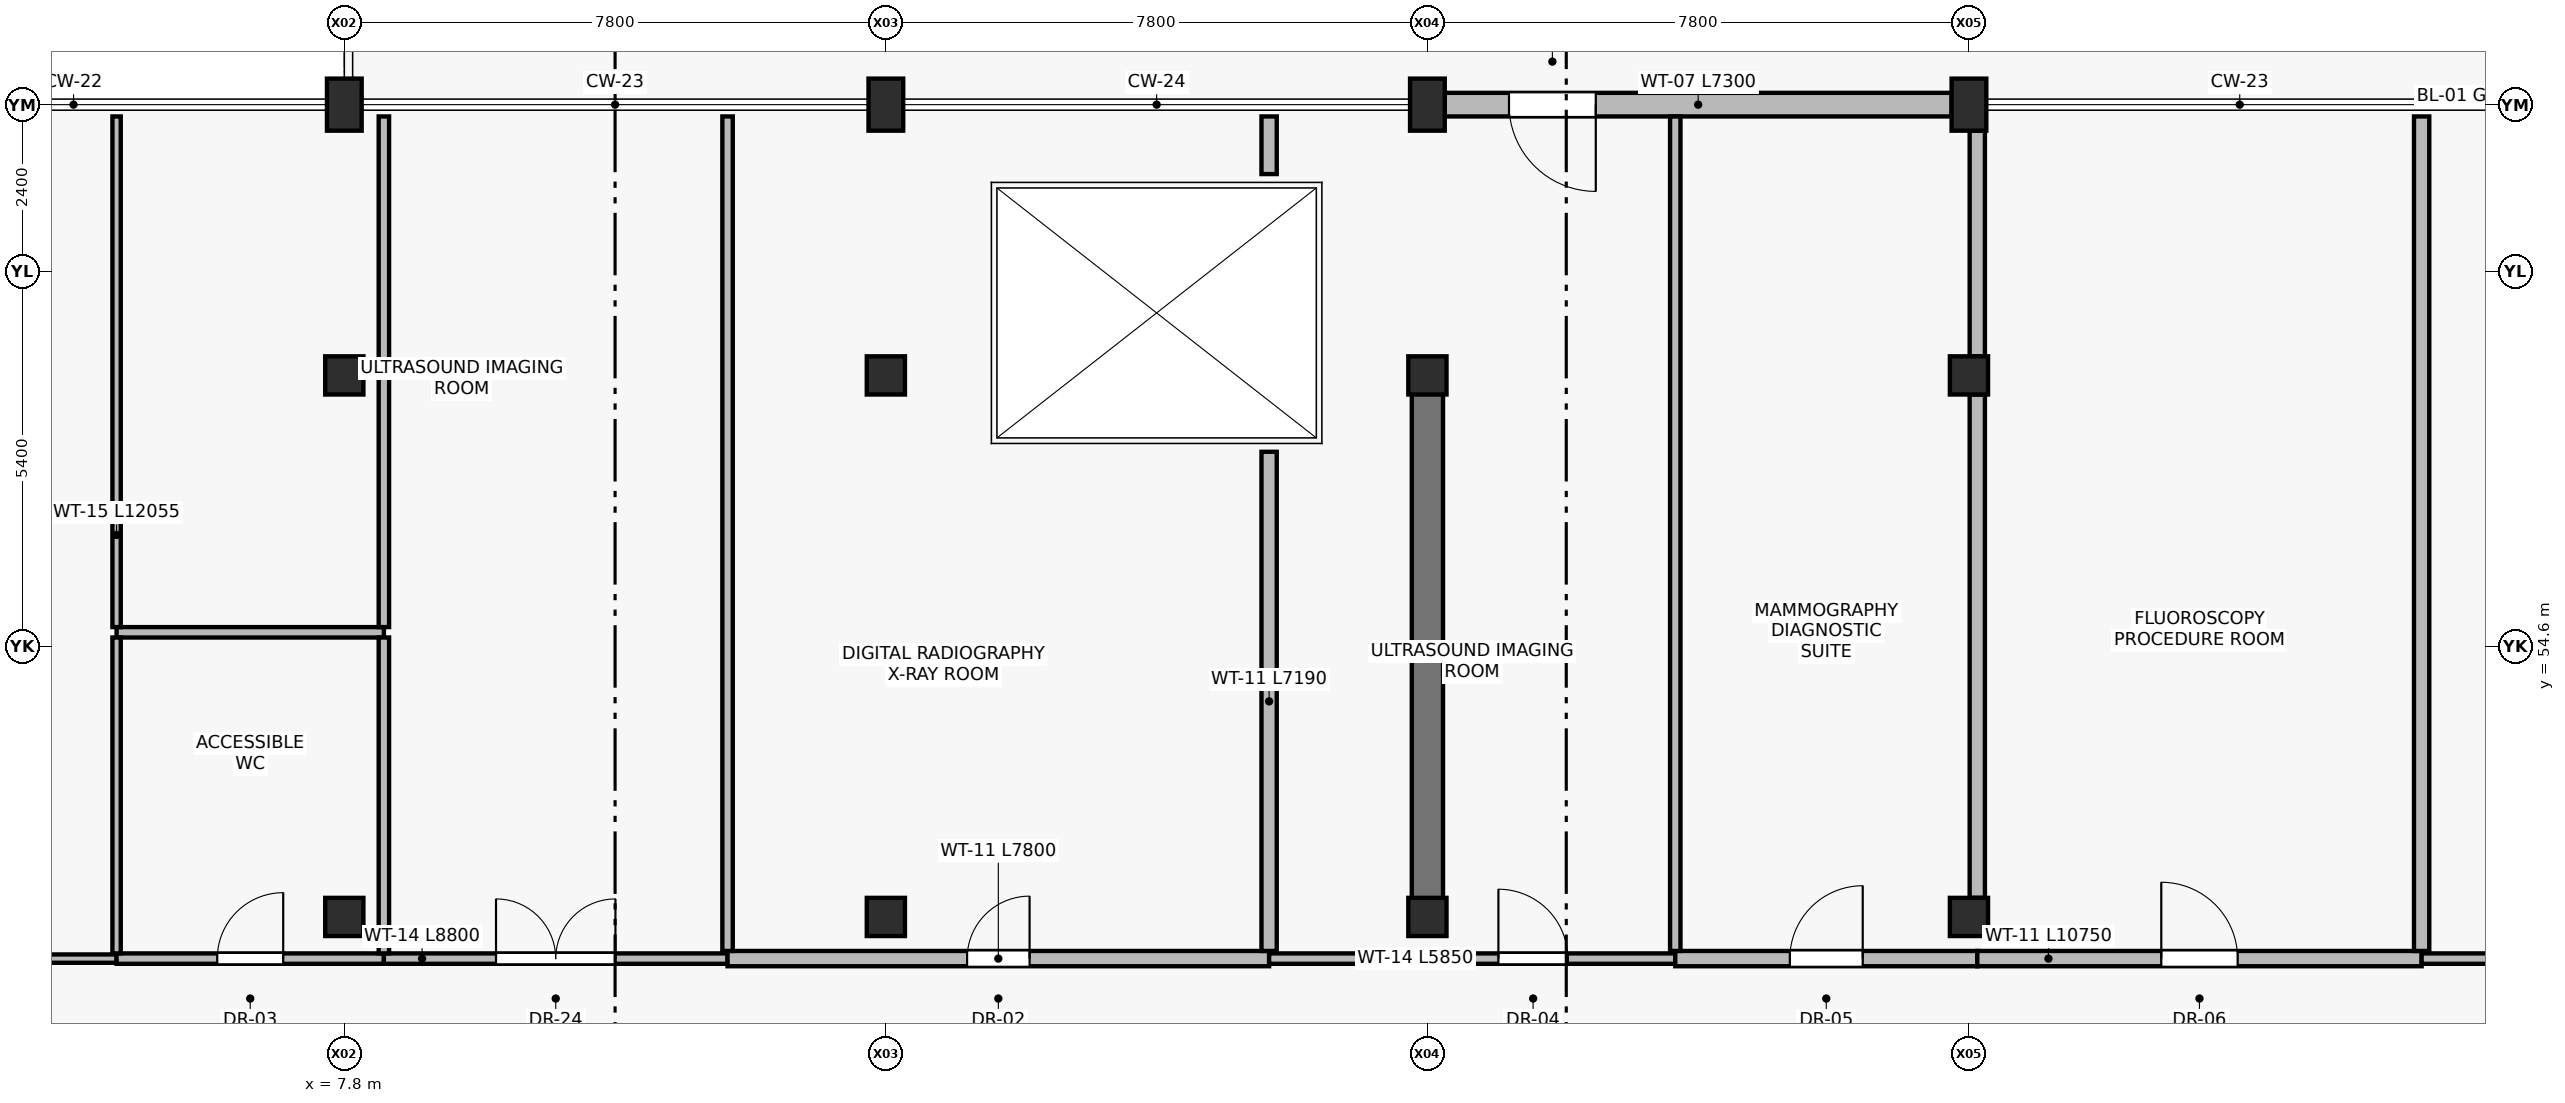
"""IFC4 building model, lengths in metres.
Left out: names, types, materials, properties, quantities, classifications, styles, units other than length and angle.
Written with IfcOpenShell. Run it as: python <this file> out.ifc"""

import sys

from ifc_helpers import new_model, si_unit, direction, frame, frame_2d, origin, origin_2d, place, context, subcontext, project, spatial, rectangle, extrude, element, fill, save


model = new_model("IFC4")
c1 = context("Model", 3, precision=1e-05, world=origin(), true_north=direction((0.0, 1.0)))
c2 = subcontext(c1, "Body", "Model", "MODEL_VIEW")
j1 = project(units=[si_unit("LENGTHUNIT", "METRE"), si_unit("PLANEANGLEUNIT", "RADIAN")], contexts=[c1])
p1 = place(None, origin())
s1 = spatial("IfcSite", under=j1, at=p1, CompositionType="ELEMENT")
p2 = place(p1, origin())
s2 = spatial("IfcBuilding", under=s1, at=p2, CompositionType="ELEMENT")
p3 = place(p2, frame((0.0, 0.0, 4.8)))
s3 = spatial("IfcBuildingStorey", under=s2, at=p3, CompositionType="ELEMENT", Elevation=4.8)
for number, where, z_axis, x_axis in (
    (1, (7.8, 50.7, 0.0), (0.0, 0.0, 1.0), (1.0, 0.0, 0.0)),
    (2, (7.8, 58.5, 0.0), (0.0, 0.0, 1.0), (1.0, 0.0, 0.0)),
):
    element("IfcColumn", number, at=place(p3, frame(where, z_axis=z_axis, x_axis=x_axis)), inside=s3, PredefinedType="COLUMN", context=c2, shape_type="SweptSolid", body=[
        extrude(rectangle(XDim=0.55, YDim=0.55, at=origin_2d()), origin(), (0.0, 0.0, 1.0), 4.8),
    ])
p4 = place(p3, frame((7.8, 62.4, 0.0), z_axis=(0.0, 0.0, 1.0), x_axis=(1.0, 0.0, 0.0)))
e3 = element("IfcColumn", 3, at=p4, inside=s3, PredefinedType="COLUMN", context=c2, shape_type="SweptSolid", body=[
    extrude(rectangle(XDim=0.5, YDim=0.75, at=origin_2d()), origin(), (0.0, 0.0, 1.0), 4.8),
])
for number, where, z_axis, x_axis in (
    (4, (15.6, 50.7, 0.0), (0.0, 0.0, 1.0), (1.0, 0.0, 0.0)),
    (5, (15.6, 58.5, 0.0), (0.0, 0.0, 1.0), (1.0, 0.0, 0.0)),
):
    element("IfcColumn", number, at=place(p3, frame(where, z_axis=z_axis, x_axis=x_axis)), inside=s3, PredefinedType="COLUMN", context=c2, shape_type="SweptSolid", body=[
        extrude(rectangle(XDim=0.55, YDim=0.55, at=origin_2d()), origin(), (0.0, 0.0, 1.0), 4.8),
    ])
p5 = place(p3, frame((15.6, 62.4, 0.0), z_axis=(0.0, 0.0, 1.0), x_axis=(1.0, 0.0, 0.0)))
e6 = element("IfcColumn", 6, at=p5, inside=s3, PredefinedType="COLUMN", context=c2, shape_type="SweptSolid", body=[
    extrude(rectangle(XDim=0.5, YDim=0.75, at=origin_2d()), origin(), (0.0, 0.0, 1.0), 4.8),
])
for number, where, z_axis, x_axis in (
    (7, (23.4, 50.7, 0.0), (0.0, 0.0, 1.0), (1.0, 0.0, 0.0)),
    (8, (23.4, 58.5, 0.0), (0.0, 0.0, 1.0), (1.0, 0.0, 0.0)),
):
    element("IfcColumn", number, at=place(p3, frame(where, z_axis=z_axis, x_axis=x_axis)), inside=s3, PredefinedType="COLUMN", context=c2, shape_type="SweptSolid", body=[
        extrude(rectangle(XDim=0.55, YDim=0.55, at=origin_2d()), origin(), (0.0, 0.0, 1.0), 4.8),
    ])
p6 = place(p3, frame((23.4, 62.4, 0.0), z_axis=(0.0, 0.0, 1.0), x_axis=(1.0, 0.0, 0.0)))
e9 = element("IfcColumn", 9, at=p6, inside=s3, PredefinedType="COLUMN", context=c2, shape_type="SweptSolid", body=[
    extrude(rectangle(XDim=0.5, YDim=0.75, at=origin_2d()), origin(), (0.0, 0.0, 1.0), 4.8),
])
for number, where, z_axis, x_axis in (
    (10, (31.2, 50.7, 0.0), (0.0, 0.0, 1.0), (1.0, 0.0, 0.0)),
    (11, (31.2, 58.5, 0.0), (0.0, 0.0, 1.0), (1.0, 0.0, 0.0)),
):
    element("IfcColumn", number, at=place(p3, frame(where, z_axis=z_axis, x_axis=x_axis)), inside=s3, PredefinedType="COLUMN", context=c2, shape_type="SweptSolid", body=[
        extrude(rectangle(XDim=0.55, YDim=0.55, at=origin_2d()), origin(), (0.0, 0.0, 1.0), 4.8),
    ])
p7 = place(p3, frame((31.2, 62.4, 0.0), z_axis=(0.0, 0.0, 1.0), x_axis=(1.0, 0.0, 0.0)))
e12 = element("IfcColumn", 12, at=p7, inside=s3, PredefinedType="COLUMN", context=c2, shape_type="SweptSolid", body=[
    extrude(rectangle(XDim=0.5, YDim=0.75, at=origin_2d()), origin(), (0.0, 0.0, 1.0), 4.8),
])
p8 = place(p3, frame((23.65, 62.4, 0.0), z_axis=(0.0, 0.0, 1.0), x_axis=(1.0, 0.0, 0.0)))
e13 = element("IfcWall", 13, at=p8, inside=s3, PredefinedType="STANDARD", context=c2, shape_type="SweptSolid", body=[
    extrude(rectangle(XDim=7.3, YDim=0.34, at=frame_2d((3.65, 0.0))), origin(), (0.0, 0.0, 1.0), 4.14),
])
p9 = place(p8, frame((0.925, 0.0, 0.0)))
e14 = element("IfcOpeningElement", 14, at=p9, cuts=e13, PredefinedType="OPENING", context=c2, shape_type="SweptSolid", body=[
    extrude(rectangle(XDim=1.25, YDim=2.2, at=frame_2d((0.625, 1.1))), frame((0.0, 0.18, 0.0), z_axis=(0.0, -1.0, 0.0), x_axis=(1.0, 0.0, 0.0)), (0.0, 0.0, 1.0), 0.36),
])
p10 = place(p3, frame((23.4, 50.85, 0.0), z_axis=(0.0, 0.0, 1.0), x_axis=(0.0, 1.0, 0.0)))
e15 = element("IfcWall", 15, at=p10, inside=s3, PredefinedType="SHEAR", context=c2, shape_type="SweptSolid", body=[
    extrude(rectangle(XDim=7.5, YDim=0.45, at=frame_2d((3.75, 0.0))), origin(), (0.0, 0.0, 1.0), 4.54),
])
p11 = place(p3, frame((0.17, 50.1, 0.0), z_axis=(0.0, 0.0, 1.0), x_axis=(1.0, 0.0, 0.0)))
e16 = element("IfcWall", 16, at=p11, inside=s3, PredefinedType="PARTITIONING", context=c2, shape_type="SweptSolid", body=[
    extrude(rectangle(XDim=4.35, YDim=0.12, at=frame_2d((2.175, 0.0))), origin(), (0.0, 0.0, 1.0), 4.54),
])
p12 = place(p11, frame((1.535, 0.0, 0.0)))
e17 = element("IfcOpeningElement", 17, at=p12, cuts=e16, PredefinedType="OPENING", context=c2, shape_type="SweptSolid", body=[
    extrude(rectangle(XDim=1.28, YDim=2.25, at=frame_2d((0.64, 1.125))), frame((0.0, 0.07, 0.0), z_axis=(0.0, -1.0, 0.0), x_axis=(1.0, 0.0, 0.0)), (0.0, 0.0, 1.0), 0.14),
])
p13 = place(p3, frame((4.52, 50.1, 0.0), z_axis=(0.0, 0.0, 1.0), x_axis=(1.0, 0.0, 0.0)))
e18 = element("IfcWall", 18, at=p13, inside=s3, PredefinedType="PARTITIONING", context=c2, shape_type="SweptSolid", body=[
    extrude(rectangle(XDim=3.85, YDim=0.15, at=frame_2d((1.925, 0.0))), origin(), (0.0, 0.0, 1.0), 4.54),
])
p14 = place(p13, frame((1.45, 0.0, 0.0)))
e19 = element("IfcOpeningElement", 19, at=p14, cuts=e18, PredefinedType="OPENING", context=c2, shape_type="SweptSolid", body=[
    extrude(rectangle(XDim=0.95, YDim=2.1, at=frame_2d((0.475, 1.05))), frame((0.0, 0.085, 0.0), z_axis=(0.0, -1.0, 0.0), x_axis=(1.0, 0.0, 0.0)), (0.0, 0.0, 1.0), 0.17),
])
p15 = place(p3, frame((4.52, 54.8, 0.0), z_axis=(0.0, 0.0, 1.0), x_axis=(1.0, 0.0, 0.0)))
e20 = element("IfcWall", 20, at=p15, inside=s3, PredefinedType="PARTITIONING", context=c2, shape_type="SweptSolid", body=[
    extrude(rectangle(XDim=3.85, YDim=0.15, at=frame_2d((1.925, 0.0))), origin(), (0.0, 0.0, 1.0), 4.54),
])
p16 = place(p3, frame((8.37, 50.1, 0.0), z_axis=(0.0, 0.0, 1.0), x_axis=(1.0, 0.0, 0.0)))
e21 = element("IfcWall", 21, at=p16, inside=s3, PredefinedType="PARTITIONING", context=c2, shape_type="SweptSolid", body=[
    extrude(rectangle(XDim=4.95, YDim=0.15, at=frame_2d((2.475, 0.0))), origin(), (0.0, 0.0, 1.0), 4.54),
])
p17 = place(p16, frame((1.615, 0.0, 0.0)))
e22 = element("IfcOpeningElement", 22, at=p17, cuts=e21, PredefinedType="OPENING", context=c2, shape_type="SweptSolid", body=[
    extrude(rectangle(XDim=1.72, YDim=2.3, at=frame_2d((0.86, 1.15))), frame((0.0, 0.085, 0.0), z_axis=(0.0, -1.0, 0.0), x_axis=(1.0, 0.0, 0.0)), (0.0, 0.0, 1.0), 0.17),
])
p18 = place(p3, frame((13.32, 50.1, 0.0), z_axis=(0.0, 0.0, 1.0), x_axis=(1.0, 0.0, 0.0)))
e23 = element("IfcWall", 23, at=p18, inside=s3, PredefinedType="PARTITIONING", context=c2, shape_type="SweptSolid", body=[
    extrude(rectangle(XDim=7.8, YDim=0.22, at=frame_2d((3.9, 0.0))), origin(), (0.0, 0.0, 1.0), 4.54),
])
p19 = place(p18, frame((3.45, 0.0, 0.0)))
e24 = element("IfcOpeningElement", 24, at=p19, cuts=e23, PredefinedType="OPENING", context=c2, shape_type="SweptSolid", body=[
    extrude(rectangle(XDim=0.9, YDim=2.1, at=frame_2d((0.45, 1.05))), frame((0.0, 0.12, 0.0), z_axis=(0.0, -1.0, 0.0), x_axis=(1.0, 0.0, 0.0)), (0.0, 0.0, 1.0), 0.24),
])
p20 = place(p3, frame((21.12, 50.1, 0.0), z_axis=(0.0, 0.0, 1.0), x_axis=(1.0, 0.0, 0.0)))
e25 = element("IfcWall", 25, at=p20, inside=s3, PredefinedType="PARTITIONING", context=c2, shape_type="SweptSolid", body=[
    extrude(rectangle(XDim=5.85, YDim=0.15, at=frame_2d((2.925, 0.0))), origin(), (0.0, 0.0, 1.0), 4.54),
])
p21 = place(p20, frame((3.302, 0.0, 0.0)))
e26 = element("IfcOpeningElement", 26, at=p21, cuts=e25, PredefinedType="OPENING", context=c2, shape_type="SweptSolid", body=[
    extrude(rectangle(XDim=1.0, YDim=2.1, at=frame_2d((0.5, 1.05))), frame((0.0, 0.085, 0.0), z_axis=(0.0, -1.0, 0.0), x_axis=(1.0, 0.0, 0.0)), (0.0, 0.0, 1.0), 0.17),
])
p22 = place(p3, frame((26.97, 50.1, 0.0), z_axis=(0.0, 0.0, 1.0), x_axis=(1.0, 0.0, 0.0)))
e27 = element("IfcWall", 27, at=p22, inside=s3, PredefinedType="PARTITIONING", context=c2, shape_type="SweptSolid", body=[
    extrude(rectangle(XDim=4.35, YDim=0.22, at=frame_2d((2.175, 0.0))), origin(), (0.0, 0.0, 1.0), 4.54),
])
p23 = place(p22, frame((1.65, 0.0, 0.0)))
e28 = element("IfcOpeningElement", 28, at=p23, cuts=e27, PredefinedType="OPENING", context=c2, shape_type="SweptSolid", body=[
    extrude(rectangle(XDim=1.05, YDim=2.15, at=frame_2d((0.525, 1.075))), frame((0.0, 0.12, 0.0), z_axis=(0.0, -1.0, 0.0), x_axis=(1.0, 0.0, 0.0)), (0.0, 0.0, 1.0), 0.24),
])
p24 = place(p3, frame((31.32, 50.1, 0.0), z_axis=(0.0, 0.0, 1.0), x_axis=(1.0, 0.0, 0.0)))
e29 = element("IfcWall", 29, at=p24, inside=s3, PredefinedType="PARTITIONING", context=c2, shape_type="SweptSolid", body=[
    extrude(rectangle(XDim=6.4, YDim=0.22, at=frame_2d((3.2, 0.0))), origin(), (0.0, 0.0, 1.0), 4.54),
])
p25 = place(p24, frame((2.65, 0.0, 0.0)))
e30 = element("IfcOpeningElement", 30, at=p25, cuts=e29, PredefinedType="OPENING", context=c2, shape_type="SweptSolid", body=[
    extrude(rectangle(XDim=1.1, YDim=2.15, at=frame_2d((0.55, 1.075))), frame((0.0, 0.12, 0.0), z_axis=(0.0, -1.0, 0.0), x_axis=(1.0, 0.0, 0.0)), (0.0, 0.0, 1.0), 0.24),
])
p26 = place(p3, frame((37.72, 50.1, 0.0), z_axis=(0.0, 0.0, 1.0), x_axis=(1.0, 0.0, 0.0)))
e31 = element("IfcWall", 31, at=p26, inside=s3, PredefinedType="PARTITIONING", context=c2, shape_type="SweptSolid", body=[
    extrude(rectangle(XDim=7.41, YDim=0.15, at=frame_2d((3.705, 0.0))), origin(), (0.0, 0.0, 1.0), 4.54),
])
p27 = place(p26, frame((3.13, 0.0, 0.0)))
e32 = element("IfcOpeningElement", 32, at=p27, cuts=e31, PredefinedType="OPENING", context=c2, shape_type="SweptSolid", body=[
    extrude(rectangle(XDim=1.15, YDim=2.2, at=frame_2d((0.575, 1.1))), frame((0.0, 0.085, 0.0), z_axis=(0.0, -1.0, 0.0), x_axis=(1.0, 0.0, 0.0)), (0.0, 0.0, 1.0), 0.17),
])
p28 = place(p3, frame((4.52, 50.175, 0.0), z_axis=(0.0, 0.0, 1.0), x_axis=(0.0, 1.0, 0.0)))
e33 = element("IfcWall", 33, at=p28, inside=s3, PredefinedType="PARTITIONING", context=c2, shape_type="SweptSolid", body=[
    extrude(rectangle(XDim=4.55, YDim=0.12, at=frame_2d((2.275, 0.0))), origin(), (0.0, 0.0, 1.0), 4.54),
])
p29 = place(p3, frame((4.52, 54.875, 0.0), z_axis=(0.0, 0.0, 1.0), x_axis=(0.0, 1.0, 0.0)))
e34 = element("IfcWall", 34, at=p29, inside=s3, PredefinedType="PARTITIONING", context=c2, shape_type="SweptSolid", body=[
    extrude(rectangle(XDim=7.355, YDim=0.12, at=frame_2d((3.677, 0.0))), origin(), (0.0, 0.0, 1.0), 4.54),
])
p30 = place(p3, frame((8.37, 50.175, 0.0), z_axis=(0.0, 0.0, 1.0), x_axis=(0.0, 1.0, 0.0)))
e35 = element("IfcWall", 35, at=p30, inside=s3, PredefinedType="PARTITIONING", context=c2, shape_type="SweptSolid", body=[
    extrude(rectangle(XDim=4.55, YDim=0.15, at=frame_2d((2.275, 0.0))), origin(), (0.0, 0.0, 1.0), 4.54),
])
p31 = place(p3, frame((8.37, 54.875, 0.0), z_axis=(0.0, 0.0, 1.0), x_axis=(0.0, 1.0, 0.0)))
e36 = element("IfcWall", 36, at=p31, inside=s3, PredefinedType="PARTITIONING", context=c2, shape_type="SweptSolid", body=[
    extrude(rectangle(XDim=7.355, YDim=0.15, at=frame_2d((3.677, 0.0))), origin(), (0.0, 0.0, 1.0), 4.54),
])
p32 = place(p3, frame((13.32, 50.21, 0.0), z_axis=(0.0, 0.0, 1.0), x_axis=(0.0, 1.0, 0.0)))
e37 = element("IfcWall", 37, at=p32, inside=s3, PredefinedType="PARTITIONING", context=c2, shape_type="SweptSolid", body=[
    extrude(rectangle(XDim=12.02, YDim=0.15, at=frame_2d((6.01, 0.0))), origin(), (0.0, 0.0, 1.0), 4.21),
])
p33 = place(p3, frame((21.12, 50.21, 0.0), z_axis=(0.0, 0.0, 1.0), x_axis=(0.0, 1.0, 0.0)))
e38 = element("IfcWall", 38, at=p33, inside=s3, PredefinedType="PARTITIONING", context=c2, shape_type="SweptSolid", body=[
    extrude(rectangle(XDim=7.19, YDim=0.22, at=frame_2d((3.595, 0.0))), origin(), (0.0, 0.0, 1.0), 4.21),
])
p34 = place(p3, frame((21.12, 61.4, 0.0), z_axis=(0.0, 0.0, 1.0), x_axis=(0.0, 1.0, 0.0)))
e39 = element("IfcWall", 39, at=p34, inside=s3, PredefinedType="PARTITIONING", context=c2, shape_type="SweptSolid", body=[
    extrude(rectangle(XDim=0.83, YDim=0.22, at=frame_2d((0.415, 0.0))), origin(), (0.0, 0.0, 1.0), 4.54),
])
p35 = place(p3, frame((26.97, 50.21, 0.0), z_axis=(0.0, 0.0, 1.0), x_axis=(0.0, 1.0, 0.0)))
e40 = element("IfcWall", 40, at=p35, inside=s3, PredefinedType="PARTITIONING", context=c2, shape_type="SweptSolid", body=[
    extrude(rectangle(XDim=12.02, YDim=0.15, at=frame_2d((6.01, 0.0))), origin(), (0.0, 0.0, 1.0), 4.54),
])
p36 = place(p3, frame((31.32, 50.975, 0.0), z_axis=(0.0, 0.0, 1.0), x_axis=(0.0, 1.0, 0.0)))
e41 = element("IfcWall", 41, at=p36, inside=s3, PredefinedType="PARTITIONING", context=c2, shape_type="SweptSolid", body=[
    extrude(rectangle(XDim=7.25, YDim=0.22, at=frame_2d((3.625, 0.0))), origin(), (0.0, 0.0, 1.0), 4.09),
])
p37 = place(p3, frame((31.32, 58.775, 0.0), z_axis=(0.0, 0.0, 1.0), x_axis=(0.0, 1.0, 0.0)))
e42 = element("IfcWall", 42, at=p37, inside=s3, PredefinedType="PARTITIONING", context=c2, shape_type="SweptSolid", body=[
    extrude(rectangle(XDim=3.25, YDim=0.22, at=frame_2d((1.625, 0.0))), origin(), (0.0, 0.0, 1.0), 4.09),
])
p38 = place(p3, frame((37.72, 50.21, 0.0), z_axis=(0.0, 0.0, 1.0), x_axis=(0.0, 1.0, 0.0)))
e43 = element("IfcWall", 43, at=p38, inside=s3, PredefinedType="PARTITIONING", context=c2, shape_type="SweptSolid", body=[
    extrude(rectangle(XDim=12.02, YDim=0.22, at=frame_2d((6.01, 0.0))), origin(), (0.0, 0.0, 1.0), 4.54),
])
p39 = place(p9, frame((1.25, 0.0, 0.0), z_axis=(0.0, 0.0, 1.0), x_axis=(-1.0, 0.0, 0.0)))
e44 = element("IfcDoor", 44, at=p39, inside=s3, OperationType="SINGLE_SWING_RIGHT", PredefinedType="DOOR", context=c2, shape_type="SweptSolid", body=[
    extrude(rectangle(XDim=1.25, YDim=2.2, at=frame_2d((0.625, 1.1))), frame((0.0, 0.025, 0.0), z_axis=(0.0, -1.0, 0.0), x_axis=(1.0, 0.0, 0.0)), (0.0, 0.0, 1.0), 0.05),
])
fill(e14, e44)
p40 = place(p14, origin())
e45 = element("IfcDoor", 45, at=p40, inside=s3, OperationType="SINGLE_SWING_RIGHT", PredefinedType="DOOR", context=c2, shape_type="SweptSolid", body=[
    extrude(rectangle(XDim=0.95, YDim=2.1, at=frame_2d((0.475, 1.05))), frame((0.0, 0.025, 0.0), z_axis=(0.0, -1.0, 0.0), x_axis=(1.0, 0.0, 0.0)), (0.0, 0.0, 1.0), 0.05),
])
fill(e19, e45)
p41 = place(p17, origin())
e46 = element("IfcDoor", 46, at=p41, inside=s3, OperationType="DOUBLE_DOOR_SINGLE_SWING", PredefinedType="DOOR", context=c2, shape_type="SweptSolid", body=[
    extrude(rectangle(XDim=1.72, YDim=2.3, at=frame_2d((0.86, 1.15))), frame((0.0, 0.025, 0.0), z_axis=(0.0, -1.0, 0.0), x_axis=(1.0, 0.0, 0.0)), (0.0, 0.0, 1.0), 0.05),
])
fill(e22, e46)
p42 = place(p19, origin())
e47 = element("IfcDoor", 47, at=p42, inside=s3, OperationType="SINGLE_SWING_RIGHT", PredefinedType="DOOR", context=c2, shape_type="SweptSolid", body=[
    extrude(rectangle(XDim=0.9, YDim=2.1, at=frame_2d((0.45, 1.05))), frame((0.0, 0.025, 0.0), z_axis=(0.0, -1.0, 0.0), x_axis=(1.0, 0.0, 0.0)), (0.0, 0.0, 1.0), 0.05),
])
fill(e24, e47)
p43 = place(p21, origin())
e48 = element("IfcDoor", 48, at=p43, inside=s3, OperationType="SINGLE_SWING_LEFT", PredefinedType="DOOR", context=c2, shape_type="SweptSolid", body=[
    extrude(rectangle(XDim=1.0, YDim=2.1, at=frame_2d((0.5, 1.05))), frame((0.0, 0.025, 0.0), z_axis=(0.0, -1.0, 0.0), x_axis=(1.0, 0.0, 0.0)), (0.0, 0.0, 1.0), 0.05),
])
fill(e26, e48)
p44 = place(p23, origin())
e49 = element("IfcDoor", 49, at=p44, inside=s3, OperationType="SINGLE_SWING_RIGHT", PredefinedType="DOOR", context=c2, shape_type="SweptSolid", body=[
    extrude(rectangle(XDim=1.05, YDim=2.15, at=frame_2d((0.525, 1.075))), frame((0.0, 0.025, 0.0), z_axis=(0.0, -1.0, 0.0), x_axis=(1.0, 0.0, 0.0)), (0.0, 0.0, 1.0), 0.05),
])
fill(e28, e49)
p45 = place(p25, origin())
e50 = element("IfcDoor", 50, at=p45, inside=s3, OperationType="SINGLE_SWING_LEFT", PredefinedType="DOOR", context=c2, shape_type="SweptSolid", body=[
    extrude(rectangle(XDim=1.1, YDim=2.15, at=frame_2d((0.55, 1.075))), frame((0.0, 0.025, 0.0), z_axis=(0.0, -1.0, 0.0), x_axis=(1.0, 0.0, 0.0)), (0.0, 0.0, 1.0), 0.05),
])
fill(e30, e50)
save(model, sys.argv[1])
